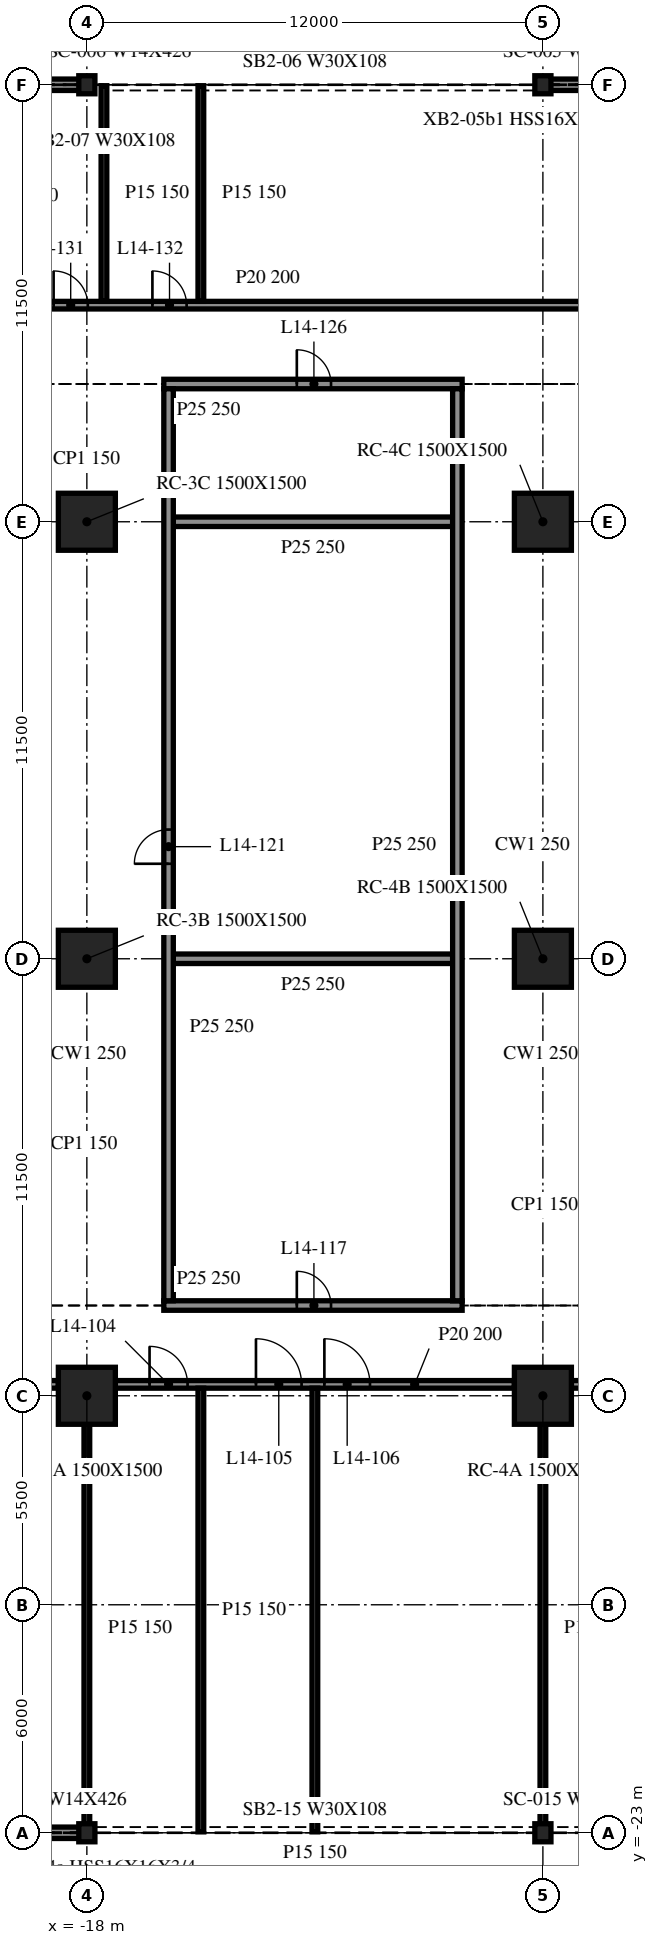
"""IFC4 building model, lengths in metres.
Left out: names, types, materials, properties, quantities, classifications, styles, units other than length and angle.
Written with IfcOpenShell. Run it as: python <this file> out.ifc"""

import sys

from ifc_helpers import new_model, si_unit, direction, frame, frame_2d, origin, origin_2d, place, context, subcontext, project, spatial, rectangle, i_section, extrude, element, fill, save


model = new_model("IFC4")
c1 = context("Model", 3, precision=1e-05, world=origin(), true_north=direction((0.0, 1.0)))
c2 = subcontext(c1, "Body", "Model", "MODEL_VIEW")
j1 = project(units=[si_unit("LENGTHUNIT", "METRE"), si_unit("PLANEANGLEUNIT", "RADIAN")], contexts=[c1])
p1 = place(None, origin())
s1 = spatial("IfcSite", under=j1, at=p1, CompositionType="ELEMENT")
p2 = place(p1, origin())
s2 = spatial("IfcBuilding", under=s1, at=p2, CompositionType="ELEMENT")
p3 = place(p2, frame((0.0, 0.0, 63.2)))
s3 = spatial("IfcBuildingStorey", under=s2, at=p3, CompositionType="ELEMENT", Elevation=63.2)
for number, where, z_axis, x_axis in (
    (1, (-18.0, -11.5, -0.34), (0.0, 0.0, 1.0), (1.0, 0.0, 0.0)),
    (2, (-18.0, 0.0, -0.34), (0.0, 0.0, 1.0), (1.0, 0.0, 0.0)),
    (3, (-18.0, 11.5, -0.34), (0.0, 0.0, 1.0), (1.0, 0.0, 0.0)),
    (4, (-6.0, -11.5, -0.34), (0.0, 0.0, 1.0), (1.0, 0.0, 0.0)),
    (5, (-6.0, 0.0, -0.34), (0.0, 0.0, 1.0), (1.0, 0.0, 0.0)),
    (6, (-6.0, 11.5, -0.34), (0.0, 0.0, 1.0), (1.0, 0.0, 0.0)),
):
    element("IfcColumn", number, at=place(p3, frame(where, z_axis=z_axis, x_axis=x_axis)), inside=s3, PredefinedType="COLUMN", context=c2, shape_type="SweptSolid", body=[
        extrude(rectangle(XDim=1.5, YDim=1.5, at=origin_2d()), origin(), (0.0, 0.0, 1.0), 4.3),
    ])
for number, where, z_axis, x_axis in (
    (7, (-6.0, 23.0, -0.34), (0.0, 0.0, 1.0), (1.0, 0.0, 0.0)),
    (8, (-18.0, 23.0, -0.34), (0.0, 0.0, 1.0), (1.0, 0.0, 0.0)),
    (9, (-18.0, -23.0, -0.34), (0.0, 0.0, 1.0), (1.0, 0.0, 0.0)),
    (10, (-6.0, -23.0, -0.34), (0.0, 0.0, 1.0), (1.0, 0.0, 0.0)),
):
    element("IfcColumn", number, at=place(p3, frame(where, z_axis=z_axis, x_axis=x_axis)), inside=s3, PredefinedType="COLUMN", context=c2, shape_type="SweptSolid", body=[
        extrude(i_section(OverallWidth=0.424, OverallDepth=0.475, WebThickness=0.048, FlangeThickness=0.077, at=origin_2d()), origin(), (0.0, 0.0, 1.0), 4.3),
    ])
for number, where, z_axis, x_axis in (
    (11, (5.976, 23.0, 0.0), (0.0, 0.0, 1.0), (-1.0, 0.0, 0.0)),
    (12, (-18.024, 23.0, 0.0), (0.0, 0.0, 1.0), (-1.0, 0.0, 0.0)),
    (13, (-29.976, -23.0, 0.0), (0.0, 0.0, 1.0), (1.0, 0.0, 0.0)),
):
    element("IfcWall", number, at=place(p3, frame(where, z_axis=z_axis, x_axis=x_axis)), inside=s3, PredefinedType="NOTDEFINED", context=c2, shape_type="SweptSolid", body=[
        extrude(rectangle(XDim=11.952, YDim=0.3, at=frame_2d((5.976, 0.0))), origin(), (0.0, 0.0, 1.0), 3.203),
    ])
p4 = place(p3, frame((-29.25, -11.2, 0.0), z_axis=(0.0, 0.0, 1.0), x_axis=(1.0, 0.0, 0.0)))
e14 = element("IfcWall", 14, at=p4, inside=s3, PredefinedType="PARTITIONING", context=c2, shape_type="SweptSolid", body=[
    extrude(rectangle(XDim=10.5, YDim=0.2, at=frame_2d((5.25, 0.0))), origin(), (0.0, 0.0, 1.0), 3.96),
])
p5 = place(p4, frame((4.7, 0.0, 0.0)))
e15 = element("IfcOpeningElement", 15, at=p5, cuts=e14, PredefinedType="OPENING", context=c2, shape_type="SweptSolid", body=[
    extrude(rectangle(XDim=1.2, YDim=2.1, at=frame_2d((0.6, 1.05))), frame((0.0, 0.11, 0.0), z_axis=(0.0, -1.0, 0.0), x_axis=(1.0, 0.0, 0.0)), (0.0, 0.0, 1.0), 0.22),
])
p6 = place(p3, frame((-17.25, -11.2, 0.0), z_axis=(0.0, 0.0, 1.0), x_axis=(1.0, 0.0, 0.0)))
e16 = element("IfcWall", 16, at=p6, inside=s3, PredefinedType="PARTITIONING", context=c2, shape_type="SweptSolid", body=[
    extrude(rectangle(XDim=10.5, YDim=0.2, at=frame_2d((5.25, 0.0))), origin(), (0.0, 0.0, 1.0), 3.96),
])
p7 = place(p6, frame((0.9, 0.0, 0.0)))
e17 = element("IfcOpeningElement", 17, at=p7, cuts=e16, PredefinedType="OPENING", context=c2, shape_type="SweptSolid", body=[
    extrude(rectangle(XDim=1.0, YDim=2.1, at=frame_2d((0.5, 1.05))), frame((0.0, 0.11, 0.0), z_axis=(0.0, -1.0, 0.0), x_axis=(1.0, 0.0, 0.0)), (0.0, 0.0, 1.0), 0.22),
])
p8 = place(p6, frame((3.7, 0.0, 0.0)))
e18 = element("IfcOpeningElement", 18, at=p8, cuts=e16, PredefinedType="OPENING", context=c2, shape_type="SweptSolid", body=[
    extrude(rectangle(XDim=1.2, YDim=2.1, at=frame_2d((0.6, 1.05))), frame((0.0, 0.11, 0.0), z_axis=(0.0, -1.0, 0.0), x_axis=(1.0, 0.0, 0.0)), (0.0, 0.0, 1.0), 0.22),
])
p9 = place(p6, frame((5.5, 0.0, 0.0)))
e19 = element("IfcOpeningElement", 19, at=p9, cuts=e16, PredefinedType="OPENING", context=c2, shape_type="SweptSolid", body=[
    extrude(rectangle(XDim=1.2, YDim=2.1, at=frame_2d((0.6, 1.05))), frame((0.0, 0.11, 0.0), z_axis=(0.0, -1.0, 0.0), x_axis=(1.0, 0.0, 0.0)), (0.0, 0.0, 1.0), 0.22),
])
p10 = place(p3, frame((-5.25, -11.2, 0.0), z_axis=(0.0, 0.0, 1.0), x_axis=(1.0, 0.0, 0.0)))
e20 = element("IfcWall", 20, at=p10, inside=s3, PredefinedType="PARTITIONING", context=c2, shape_type="SweptSolid", body=[
    extrude(rectangle(XDim=10.5, YDim=0.2, at=frame_2d((5.25, 0.0))), origin(), (0.0, 0.0, 1.0), 3.96),
])
p11 = place(p10, frame((4.7, 0.0, 0.0)))
e21 = element("IfcOpeningElement", 21, at=p11, cuts=e20, PredefinedType="OPENING", context=c2, shape_type="SweptSolid", body=[
    extrude(rectangle(XDim=1.2, YDim=2.1, at=frame_2d((0.6, 1.05))), frame((0.0, 0.11, 0.0), z_axis=(0.0, -1.0, 0.0), x_axis=(1.0, 0.0, 0.0)), (0.0, 0.0, 1.0), 0.22),
])
p12 = place(p3, frame((-15.975, -9.125, 0.0), z_axis=(0.0, 0.0, 1.0), x_axis=(1.0, 0.0, 0.0)))
e22 = element("IfcWall", 22, at=p12, inside=s3, PredefinedType="PARTITIONING", context=c2, shape_type="SweptSolid", body=[
    extrude(rectangle(XDim=7.85, YDim=0.25, at=frame_2d((3.925, 0.0))), origin(), (0.0, 0.0, 1.0), 3.96),
])
p13 = place(p12, frame((3.5, 0.0, 0.0)))
e23 = element("IfcOpeningElement", 23, at=p13, cuts=e22, PredefinedType="OPENING", context=c2, shape_type="SweptSolid", body=[
    extrude(rectangle(XDim=0.9, YDim=2.1, at=frame_2d((0.45, 1.05))), frame((0.0, 0.135, 0.0), z_axis=(0.0, -1.0, 0.0), x_axis=(1.0, 0.0, 0.0)), (0.0, 0.0, 1.0), 0.27),
])
for number, where, z_axis, x_axis in (
    (24, (-15.725, 0.0, 0.0), (0.0, 0.0, 1.0), (1.0, 0.0, 0.0)),
    (25, (-15.725, 11.5, 0.0), (0.0, 0.0, 1.0), (1.0, 0.0, 0.0)),
):
    element("IfcWall", number, at=place(p3, frame(where, z_axis=z_axis, x_axis=x_axis)), inside=s3, PredefinedType="PARTITIONING", context=c2, shape_type="SweptSolid", body=[
        extrude(rectangle(XDim=7.35, YDim=0.25, at=frame_2d((3.675, 0.0))), origin(), (0.0, 0.0, 1.0), 3.96),
    ])
p14 = place(p3, frame((-15.975, 15.125, 0.0), z_axis=(0.0, 0.0, 1.0), x_axis=(1.0, 0.0, 0.0)))
e26 = element("IfcWall", 26, at=p14, inside=s3, PredefinedType="PARTITIONING", context=c2, shape_type="SweptSolid", body=[
    extrude(rectangle(XDim=7.85, YDim=0.25, at=frame_2d((3.925, 0.0))), origin(), (0.0, 0.0, 1.0), 3.96),
])
p15 = place(p14, frame((3.5, 0.0, 0.0)))
e27 = element("IfcOpeningElement", 27, at=p15, cuts=e26, PredefinedType="OPENING", context=c2, shape_type="SweptSolid", body=[
    extrude(rectangle(XDim=0.9, YDim=2.1, at=frame_2d((0.45, 1.05))), frame((0.0, 0.135, 0.0), z_axis=(0.0, -1.0, 0.0), x_axis=(1.0, 0.0, 0.0)), (0.0, 0.0, 1.0), 0.27),
])
p16 = place(p3, frame((-41.975, 17.2, 0.0), z_axis=(0.0, 0.0, 1.0), x_axis=(1.0, 0.0, 0.0)))
e28 = element("IfcWall", 28, at=p16, inside=s3, PredefinedType="PARTITIONING", context=c2, shape_type="SweptSolid", body=[
    extrude(rectangle(XDim=95.782, YDim=0.2, at=frame_2d((47.891, 0.0))), origin(), (0.0, 0.0, 1.0), 3.96),
])
p17 = place(p16, frame((13.7, 0.0, 0.0)))
e29 = element("IfcOpeningElement", 29, at=p17, cuts=e28, PredefinedType="OPENING", context=c2, shape_type="SweptSolid", body=[
    extrude(rectangle(XDim=0.9, YDim=2.1, at=frame_2d((0.45, 1.05))), frame((0.0, 0.11, 0.0), z_axis=(0.0, -1.0, 0.0), x_axis=(1.0, 0.0, 0.0)), (0.0, 0.0, 1.0), 0.22),
])
p18 = place(p16, frame((19.7, 0.0, 0.0)))
e30 = element("IfcOpeningElement", 30, at=p18, cuts=e28, PredefinedType="OPENING", context=c2, shape_type="SweptSolid", body=[
    extrude(rectangle(XDim=0.9, YDim=2.1, at=frame_2d((0.45, 1.05))), frame((0.0, 0.11, 0.0), z_axis=(0.0, -1.0, 0.0), x_axis=(1.0, 0.0, 0.0)), (0.0, 0.0, 1.0), 0.22),
])
p19 = place(p16, frame((23.1, 0.0, 0.0)))
e31 = element("IfcOpeningElement", 31, at=p19, cuts=e28, PredefinedType="OPENING", context=c2, shape_type="SweptSolid", body=[
    extrude(rectangle(XDim=0.9, YDim=2.1, at=frame_2d((0.45, 1.05))), frame((0.0, 0.11, 0.0), z_axis=(0.0, -1.0, 0.0), x_axis=(1.0, 0.0, 0.0)), (0.0, 0.0, 1.0), 0.22),
])
p20 = place(p16, frame((25.7, 0.0, 0.0)))
e32 = element("IfcOpeningElement", 32, at=p20, cuts=e28, PredefinedType="OPENING", context=c2, shape_type="SweptSolid", body=[
    extrude(rectangle(XDim=0.9, YDim=2.1, at=frame_2d((0.45, 1.05))), frame((0.0, 0.11, 0.0), z_axis=(0.0, -1.0, 0.0), x_axis=(1.0, 0.0, 0.0)), (0.0, 0.0, 1.0), 0.22),
])
p21 = place(p16, frame((40.7, 0.0, 0.0)))
e33 = element("IfcOpeningElement", 33, at=p21, cuts=e28, PredefinedType="OPENING", context=c2, shape_type="SweptSolid", body=[
    extrude(rectangle(XDim=0.9, YDim=2.1, at=frame_2d((0.45, 1.05))), frame((0.0, 0.11, 0.0), z_axis=(0.0, -1.0, 0.0), x_axis=(1.0, 0.0, 0.0)), (0.0, 0.0, 1.0), 0.22),
])
p22 = place(p16, frame((46.7, 0.0, 0.0)))
e34 = element("IfcOpeningElement", 34, at=p22, cuts=e28, PredefinedType="OPENING", context=c2, shape_type="SweptSolid", body=[
    extrude(rectangle(XDim=0.9, YDim=2.1, at=frame_2d((0.45, 1.05))), frame((0.0, 0.11, 0.0), z_axis=(0.0, -1.0, 0.0), x_axis=(1.0, 0.0, 0.0)), (0.0, 0.0, 1.0), 0.22),
])
p23 = place(p16, frame((48.1, 0.0, 0.0)))
e35 = element("IfcOpeningElement", 35, at=p23, cuts=e28, PredefinedType="OPENING", context=c2, shape_type="SweptSolid", body=[
    extrude(rectangle(XDim=0.9, YDim=2.1, at=frame_2d((0.45, 1.05))), frame((0.0, 0.11, 0.0), z_axis=(0.0, -1.0, 0.0), x_axis=(1.0, 0.0, 0.0)), (0.0, 0.0, 1.0), 0.22),
])
p24 = place(p16, frame((51.5, 0.0, 0.0)))
e36 = element("IfcOpeningElement", 36, at=p24, cuts=e28, PredefinedType="OPENING", context=c2, shape_type="SweptSolid", body=[
    extrude(rectangle(XDim=0.9, YDim=2.1, at=frame_2d((0.45, 1.05))), frame((0.0, 0.11, 0.0), z_axis=(0.0, -1.0, 0.0), x_axis=(1.0, 0.0, 0.0)), (0.0, 0.0, 1.0), 0.22),
])
p25 = place(p16, frame((54.1, 0.0, 0.0)))
e37 = element("IfcOpeningElement", 37, at=p25, cuts=e28, PredefinedType="OPENING", context=c2, shape_type="SweptSolid", body=[
    extrude(rectangle(XDim=0.9, YDim=2.1, at=frame_2d((0.45, 1.05))), frame((0.0, 0.11, 0.0), z_axis=(0.0, -1.0, 0.0), x_axis=(1.0, 0.0, 0.0)), (0.0, 0.0, 1.0), 0.22),
])
p26 = place(p16, frame((69.1, 0.0, 0.0)))
e38 = element("IfcOpeningElement", 38, at=p26, cuts=e28, PredefinedType="OPENING", context=c2, shape_type="SweptSolid", body=[
    extrude(rectangle(XDim=0.9, YDim=2.1, at=frame_2d((0.45, 1.05))), frame((0.0, 0.11, 0.0), z_axis=(0.0, -1.0, 0.0), x_axis=(1.0, 0.0, 0.0)), (0.0, 0.0, 1.0), 0.22),
])
p27 = place(p16, frame((75.1, 0.0, 0.0)))
e39 = element("IfcOpeningElement", 39, at=p27, cuts=e28, PredefinedType="OPENING", context=c2, shape_type="SweptSolid", body=[
    extrude(rectangle(XDim=0.9, YDim=2.1, at=frame_2d((0.45, 1.05))), frame((0.0, 0.11, 0.0), z_axis=(0.0, -1.0, 0.0), x_axis=(1.0, 0.0, 0.0)), (0.0, 0.0, 1.0), 0.22),
])
p28 = place(p16, frame((78.5, 0.0, 0.0)))
e40 = element("IfcOpeningElement", 40, at=p28, cuts=e28, PredefinedType="OPENING", context=c2, shape_type="SweptSolid", body=[
    extrude(rectangle(XDim=0.9, YDim=2.1, at=frame_2d((0.45, 1.05))), frame((0.0, 0.11, 0.0), z_axis=(0.0, -1.0, 0.0), x_axis=(1.0, 0.0, 0.0)), (0.0, 0.0, 1.0), 0.22),
])
p29 = place(p16, frame((81.1, 0.0, 0.0)))
e41 = element("IfcOpeningElement", 41, at=p29, cuts=e28, PredefinedType="OPENING", context=c2, shape_type="SweptSolid", body=[
    extrude(rectangle(XDim=0.9, YDim=2.1, at=frame_2d((0.45, 1.05))), frame((0.0, 0.11, 0.0), z_axis=(0.0, -1.0, 0.0), x_axis=(1.0, 0.0, 0.0)), (0.0, 0.0, 1.0), 0.22),
])
p30 = place(p3, frame((-18.0, -22.975, 0.0), z_axis=(0.0, 0.0, 1.0), x_axis=(0.0, 1.0, 0.0)))
e42 = element("IfcWall", 42, at=p30, inside=s3, PredefinedType="PARTITIONING", context=c2, shape_type="SweptSolid", body=[
    extrude(rectangle(XDim=10.725, YDim=0.15, at=frame_2d((5.363, 0.0))), origin(), (0.0, 0.0, 1.0), 3.96),
])
p31 = place(p3, frame((-17.55, 17.3, 0.0), z_axis=(0.0, 0.0, 1.0), x_axis=(0.0, 1.0, 0.0)))
e43 = element("IfcWall", 43, at=p31, inside=s3, PredefinedType="PARTITIONING", context=c2, shape_type="SweptSolid", body=[
    extrude(rectangle(XDim=5.675, YDim=0.15, at=frame_2d((2.837, 0.0))), origin(), (0.0, 0.0, 1.0), 3.96),
])
p32 = place(p3, frame((-15.85, -9.0, 0.0), z_axis=(0.0, 0.0, 1.0), x_axis=(0.0, 1.0, 0.0)))
e44 = element("IfcWall", 44, at=p32, inside=s3, PredefinedType="PARTITIONING", context=c2, shape_type="SweptSolid", body=[
    extrude(rectangle(XDim=24.0, YDim=0.25, at=frame_2d((12.0, 0.0))), origin(), (0.0, 0.0, 1.0), 3.96),
])
p33 = place(p32, frame((11.5, 0.0, 0.0)))
e45 = element("IfcOpeningElement", 45, at=p33, cuts=e44, PredefinedType="OPENING", context=c2, shape_type="SweptSolid", body=[
    extrude(rectangle(XDim=0.9, YDim=2.1, at=frame_2d((0.45, 1.05))), frame((0.0, 0.135, 0.0), z_axis=(0.0, -1.0, 0.0), x_axis=(1.0, 0.0, 0.0)), (0.0, 0.0, 1.0), 0.27),
])
p34 = place(p3, frame((-15.0, -22.975, 0.0), z_axis=(0.0, 0.0, 1.0), x_axis=(0.0, 1.0, 0.0)))
e46 = element("IfcWall", 46, at=p34, inside=s3, PredefinedType="PARTITIONING", context=c2, shape_type="SweptSolid", body=[
    extrude(rectangle(XDim=11.675, YDim=0.15, at=frame_2d((5.837, 0.0))), origin(), (0.0, 0.0, 1.0), 3.96),
])
p35 = place(p3, frame((-15.0, 17.3, 0.0), z_axis=(0.0, 0.0, 1.0), x_axis=(0.0, 1.0, 0.0)))
e47 = element("IfcWall", 47, at=p35, inside=s3, PredefinedType="PARTITIONING", context=c2, shape_type="SweptSolid", body=[
    extrude(rectangle(XDim=5.675, YDim=0.15, at=frame_2d((2.837, 0.0))), origin(), (0.0, 0.0, 1.0), 3.96),
])
p36 = place(p3, frame((-12.0, -22.975, 0.0), z_axis=(0.0, 0.0, 1.0), x_axis=(0.0, 1.0, 0.0)))
e48 = element("IfcWall", 48, at=p36, inside=s3, PredefinedType="PARTITIONING", context=c2, shape_type="SweptSolid", body=[
    extrude(rectangle(XDim=11.675, YDim=0.15, at=frame_2d((5.837, 0.0))), origin(), (0.0, 0.0, 1.0), 3.96),
])
p37 = place(p3, frame((-8.25, -9.0, 0.0), z_axis=(0.0, 0.0, 1.0), x_axis=(0.0, 1.0, 0.0)))
e49 = element("IfcWall", 49, at=p37, inside=s3, PredefinedType="PARTITIONING", context=c2, shape_type="SweptSolid", body=[
    extrude(rectangle(XDim=24.0, YDim=0.25, at=frame_2d((12.0, 0.0))), origin(), (0.0, 0.0, 1.0), 3.96),
])
p38 = place(p3, frame((-6.0, -22.975, 0.0), z_axis=(0.0, 0.0, 1.0), x_axis=(0.0, 1.0, 0.0)))
e50 = element("IfcWall", 50, at=p38, inside=s3, PredefinedType="PARTITIONING", context=c2, shape_type="SweptSolid", body=[
    extrude(rectangle(XDim=10.725, YDim=0.15, at=frame_2d((5.363, 0.0))), origin(), (0.0, 0.0, 1.0), 3.96),
])
p39 = place(p7, origin())
e51 = element("IfcDoor", 51, at=p39, inside=s3, OperationType="SINGLE_SWING_RIGHT", PredefinedType="DOOR", context=c2, shape_type="SweptSolid", body=[
    extrude(rectangle(XDim=1.0, YDim=2.1, at=frame_2d((0.5, 1.05))), frame((0.0, 0.025, 0.0), z_axis=(0.0, -1.0, 0.0), x_axis=(1.0, 0.0, 0.0)), (0.0, 0.0, 1.0), 0.05),
])
fill(e17, e51)
p40 = place(p8, origin())
e52 = element("IfcDoor", 52, at=p40, inside=s3, OperationType="SINGLE_SWING_RIGHT", PredefinedType="DOOR", context=c2, shape_type="SweptSolid", body=[
    extrude(rectangle(XDim=1.2, YDim=2.1, at=frame_2d((0.6, 1.05))), frame((0.0, 0.025, 0.0), z_axis=(0.0, -1.0, 0.0), x_axis=(1.0, 0.0, 0.0)), (0.0, 0.0, 1.0), 0.05),
])
fill(e18, e52)
p41 = place(p9, origin())
e53 = element("IfcDoor", 53, at=p41, inside=s3, OperationType="SINGLE_SWING_LEFT", PredefinedType="DOOR", context=c2, shape_type="SweptSolid", body=[
    extrude(rectangle(XDim=1.2, YDim=2.1, at=frame_2d((0.6, 1.05))), frame((0.0, 0.025, 0.0), z_axis=(0.0, -1.0, 0.0), x_axis=(1.0, 0.0, 0.0)), (0.0, 0.0, 1.0), 0.05),
])
fill(e19, e53)
p42 = place(p13, origin())
e54 = element("IfcDoor", 54, at=p42, inside=s3, OperationType="SINGLE_SWING_RIGHT", PredefinedType="DOOR", context=c2, shape_type="SweptSolid", body=[
    extrude(rectangle(XDim=0.9, YDim=2.1, at=frame_2d((0.45, 1.05))), frame((0.0, 0.025, 0.0), z_axis=(0.0, -1.0, 0.0), x_axis=(1.0, 0.0, 0.0)), (0.0, 0.0, 1.0), 0.05),
])
fill(e23, e54)
p43 = place(p33, origin())
e55 = element("IfcDoor", 55, at=p43, inside=s3, OperationType="SINGLE_SWING_RIGHT", PredefinedType="DOOR", context=c2, shape_type="SweptSolid", body=[
    extrude(rectangle(XDim=0.9, YDim=2.1, at=frame_2d((0.45, 1.05))), frame((0.0, 0.025, 0.0), z_axis=(0.0, -1.0, 0.0), x_axis=(1.0, 0.0, 0.0)), (0.0, 0.0, 1.0), 0.05),
])
fill(e45, e55)
p44 = place(p15, origin())
e56 = element("IfcDoor", 56, at=p44, inside=s3, OperationType="SINGLE_SWING_LEFT", PredefinedType="DOOR", context=c2, shape_type="SweptSolid", body=[
    extrude(rectangle(XDim=0.9, YDim=2.1, at=frame_2d((0.45, 1.05))), frame((0.0, 0.025, 0.0), z_axis=(0.0, -1.0, 0.0), x_axis=(1.0, 0.0, 0.0)), (0.0, 0.0, 1.0), 0.05),
])
fill(e27, e56)
p45 = place(p19, origin())
e57 = element("IfcDoor", 57, at=p45, inside=s3, OperationType="SINGLE_SWING_LEFT", PredefinedType="DOOR", context=c2, shape_type="SweptSolid", body=[
    extrude(rectangle(XDim=0.9, YDim=2.1, at=frame_2d((0.45, 1.05))), frame((0.0, 0.025, 0.0), z_axis=(0.0, -1.0, 0.0), x_axis=(1.0, 0.0, 0.0)), (0.0, 0.0, 1.0), 0.05),
])
fill(e31, e57)
p46 = place(p20, origin())
e58 = element("IfcDoor", 58, at=p46, inside=s3, OperationType="SINGLE_SWING_LEFT", PredefinedType="DOOR", context=c2, shape_type="SweptSolid", body=[
    extrude(rectangle(XDim=0.9, YDim=2.1, at=frame_2d((0.45, 1.05))), frame((0.0, 0.025, 0.0), z_axis=(0.0, -1.0, 0.0), x_axis=(1.0, 0.0, 0.0)), (0.0, 0.0, 1.0), 0.05),
])
fill(e32, e58)
save(model, sys.argv[1])
